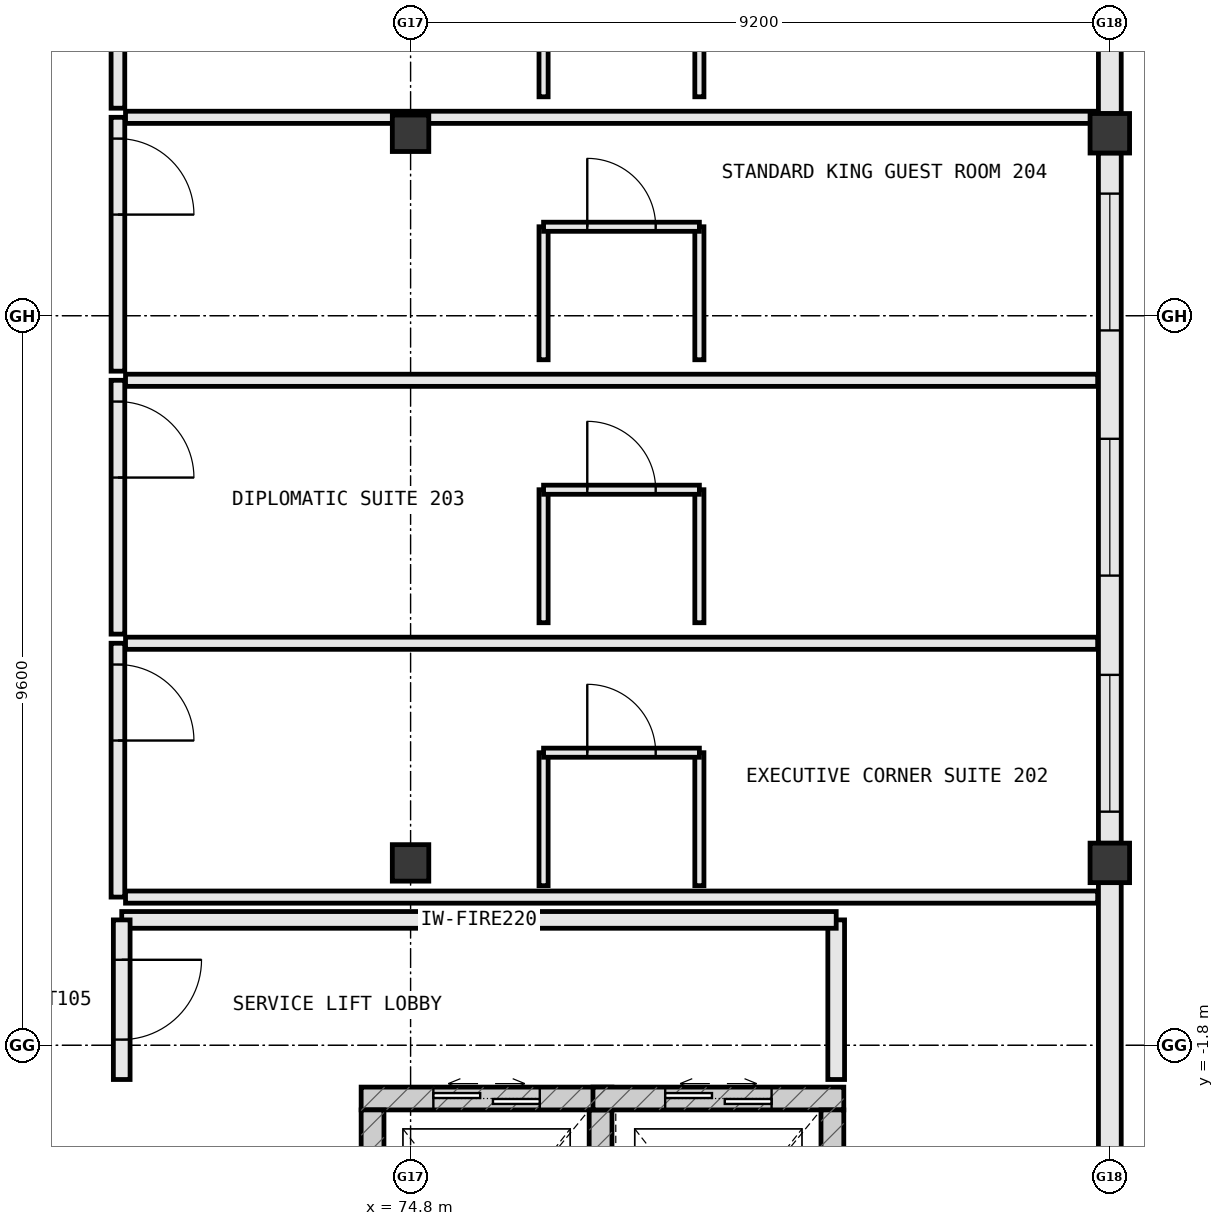
"""IFC4 building model, lengths in metres.
Left out: names, types, materials, properties, quantities, classifications, styles, units other than length and angle.
Written with IfcOpenShell. Run it as: python <this file> out.ifc"""

import sys

from ifc_helpers import new_model, si_unit, direction, frame, frame_2d, origin, origin_2d, place, context, subcontext, project, spatial, rectangle, extrude, element, fill, save


model = new_model("IFC4")
c1 = context("Model", 3, precision=1e-05, world=origin(), true_north=direction((0.0, 1.0)))
c2 = subcontext(c1, "Body", "Model", "MODEL_VIEW")
j1 = project(units=[si_unit("LENGTHUNIT", "METRE"), si_unit("PLANEANGLEUNIT", "RADIAN")], contexts=[c1])
p1 = place(None, origin())
s1 = spatial("IfcSite", under=j1, at=p1, CompositionType="ELEMENT")
p2 = place(p1, origin())
s2 = spatial("IfcBuilding", under=s1, at=p2, CompositionType="ELEMENT")
p3 = place(p2, frame((0.0, 0.0, 27.6)))
s3 = spatial("IfcBuildingStorey", under=s2, at=p3, CompositionType="ELEMENT", Elevation=27.6)
for number, where, z_axis, x_axis in (
    (1, (74.8, 0.6, 0.0), (0.0, 0.0, 1.0), (1.0, 0.0, 0.0)),
    (2, (74.8, 10.2, 0.0), (0.0, 0.0, 1.0), (1.0, 0.0, 0.0)),
):
    element("IfcColumn", number, at=place(p3, frame(where, z_axis=z_axis, x_axis=x_axis)), inside=s3, PredefinedType="COLUMN", context=c2, shape_type="SweptSolid", body=[
        extrude(rectangle(XDim=0.48, YDim=0.48, at=origin_2d()), origin(), (0.0, 0.0, 1.0), 3.8),
    ])
for number, where, z_axis, x_axis in (
    (3, (84.0, 0.6, 0.0), (0.0, 0.0, 1.0), (1.0, 0.0, 0.0)),
    (4, (84.0, 10.2, 0.0), (0.0, 0.0, 1.0), (1.0, 0.0, 0.0)),
):
    element("IfcColumn", number, at=place(p3, frame(where, z_axis=z_axis, x_axis=x_axis)), inside=s3, PredefinedType="COLUMN", context=c2, shape_type="SweptSolid", body=[
        extrude(rectangle(XDim=0.52, YDim=0.52, at=origin_2d()), origin(), (0.0, 0.0, 1.0), 3.8),
    ])
p4 = place(p3, frame((84.0, -8.742, 0.0), z_axis=(0.0, 0.0, 1.0), x_axis=(0.0, 1.0, 0.0)))
e5 = element("IfcWall", 5, at=p4, inside=s3, PredefinedType="STANDARD", context=c2, shape_type="SweptSolid", body=[
    extrude(rectangle(XDim=9.084, YDim=0.3, at=frame_2d((4.542, 0.0))), origin(), (0.0, 0.0, 1.0), 2.97),
])
p5 = place(p4, frame((1.446, 0.0, 0.85)))
e6 = element("IfcOpeningElement", 6, at=p5, cuts=e5, PredefinedType="OPENING", context=c2, shape_type="SweptSolid", body=[
    extrude(rectangle(XDim=1.65, YDim=1.8, at=frame_2d((0.825, 0.9))), frame((0.0, 0.162, 0.0), z_axis=(0.0, -1.0, 0.0), x_axis=(1.0, 0.0, 0.0)), (0.0, 0.0, 1.0), 0.324),
])
p6 = place(p3, frame((84.0, 0.858, 0.0), z_axis=(0.0, 0.0, 1.0), x_axis=(0.0, 1.0, 0.0)))
e7 = element("IfcWall", 7, at=p6, inside=s3, PredefinedType="STANDARD", context=c2, shape_type="SweptSolid", body=[
    extrude(rectangle(XDim=9.084, YDim=0.3, at=frame_2d((4.542, 0.0))), origin(), (0.0, 0.0, 1.0), 2.97),
])
p7 = place(p6, frame((0.416, 0.0, 0.85)))
e8 = element("IfcOpeningElement", 8, at=p7, cuts=e7, PredefinedType="OPENING", context=c2, shape_type="SweptSolid", body=[
    extrude(rectangle(XDim=1.8, YDim=1.85, at=frame_2d((0.9, 0.925))), frame((0.0, 0.162, 0.0), z_axis=(0.0, -1.0, 0.0), x_axis=(1.0, 0.0, 0.0)), (0.0, 0.0, 1.0), 0.324),
])
p8 = place(p6, frame((3.522, 0.0, 0.85)))
e9 = element("IfcOpeningElement", 9, at=p8, cuts=e7, PredefinedType="OPENING", context=c2, shape_type="SweptSolid", body=[
    extrude(rectangle(XDim=1.8, YDim=1.85, at=frame_2d((0.9, 0.925))), frame((0.0, 0.162, 0.0), z_axis=(0.0, -1.0, 0.0), x_axis=(1.0, 0.0, 0.0)), (0.0, 0.0, 1.0), 0.324),
])
p9 = place(p6, frame((6.748, 0.0, 0.85)))
e10 = element("IfcOpeningElement", 10, at=p9, cuts=e7, PredefinedType="OPENING", context=c2, shape_type="SweptSolid", body=[
    extrude(rectangle(XDim=1.8, YDim=1.85, at=frame_2d((0.9, 0.925))), frame((0.0, 0.162, 0.0), z_axis=(0.0, -1.0, 0.0), x_axis=(1.0, 0.0, 0.0)), (0.0, 0.0, 1.0), 0.324),
])
p10 = place(p3, frame((84.0, 10.458, 0.0), z_axis=(0.0, 0.0, 1.0), x_axis=(0.0, 1.0, 0.0)))
e11 = element("IfcWall", 11, at=p10, inside=s3, PredefinedType="STANDARD", context=c2, shape_type="SweptSolid", body=[
    extrude(rectangle(XDim=7.884, YDim=0.3, at=frame_2d((3.942, 0.0))), origin(), (0.0, 0.0, 1.0), 2.97),
])
p11 = place(p10, frame((0.842, 0.0, 0.85)))
e12 = element("IfcOpeningElement", 12, at=p11, cuts=e11, PredefinedType="OPENING", context=c2, shape_type="SweptSolid", body=[
    extrude(rectangle(XDim=1.8, YDim=1.85, at=frame_2d((0.9, 0.925))), frame((0.0, 0.162, 0.0), z_axis=(0.0, -1.0, 0.0), x_axis=(1.0, 0.0, 0.0)), (0.0, 0.0, 1.0), 0.324),
])
p12 = place(p10, frame((4.302, 0.0, 0.85)))
e13 = element("IfcOpeningElement", 13, at=p12, cuts=e11, PredefinedType="OPENING", context=c2, shape_type="SweptSolid", body=[
    extrude(rectangle(XDim=1.8, YDim=1.85, at=frame_2d((0.9, 0.925))), frame((0.0, 0.162, 0.0), z_axis=(0.0, -1.0, 0.0), x_axis=(1.0, 0.0, 0.0)), (0.0, 0.0, 1.0), 0.324),
])
p13 = place(p3, frame((77.45, -2.5, 0.0), z_axis=(0.0, 0.0, 1.0), x_axis=(-1.0, 0.0, 0.0)))
e14 = element("IfcWall", 14, at=p13, inside=s3, PredefinedType="SHEAR", context=c2, shape_type="SweptSolid", body=[
    extrude(rectangle(XDim=3.3, YDim=0.3, at=frame_2d((1.65, 0.0))), origin(), (0.0, 0.0, 1.0), 3.8),
])
p14 = place(p13, frame((0.95, 0.0, 0.0)))
e15 = element("IfcOpeningElement", 15, at=p14, cuts=e14, PredefinedType="OPENING", context=c2, shape_type="SweptSolid", body=[
    extrude(rectangle(XDim=1.4, YDim=2.2, at=frame_2d((0.7, 1.1))), frame((0.0, 0.162, 0.0), z_axis=(0.0, -1.0, 0.0), x_axis=(1.0, 0.0, 0.0)), (0.0, 0.0, 1.0), 0.324),
])
for number, where, z_axis, x_axis in (
    (16, (77.3, -5.95, 0.0), (0.0, 0.0, 1.0), (0.0, 1.0, 0.0)),
    (17, (74.3, -2.65, 0.0), (0.0, 0.0, 1.0), (0.0, -1.0, 0.0)),
):
    element("IfcWall", number, at=place(p3, frame(where, z_axis=z_axis, x_axis=x_axis)), inside=s3, PredefinedType="SHEAR", context=c2, shape_type="SweptSolid", body=[
        extrude(rectangle(XDim=3.3, YDim=0.3, at=frame_2d((1.65, 0.0))), origin(), (0.0, 0.0, 1.0), 3.8),
    ])
p15 = place(p3, frame((80.5, -2.5, 0.0), z_axis=(0.0, 0.0, 1.0), x_axis=(-1.0, 0.0, 0.0)))
e18 = element("IfcWall", 18, at=p15, inside=s3, PredefinedType="SHEAR", context=c2, shape_type="SweptSolid", body=[
    extrude(rectangle(XDim=3.3, YDim=0.3, at=frame_2d((1.65, 0.0))), origin(), (0.0, 0.0, 1.0), 3.8),
])
p16 = place(p15, frame((0.95, 0.0, 0.0)))
e19 = element("IfcOpeningElement", 19, at=p16, cuts=e18, PredefinedType="OPENING", context=c2, shape_type="SweptSolid", body=[
    extrude(rectangle(XDim=1.4, YDim=2.2, at=frame_2d((0.7, 1.1))), frame((0.0, 0.162, 0.0), z_axis=(0.0, -1.0, 0.0), x_axis=(1.0, 0.0, 0.0)), (0.0, 0.0, 1.0), 0.324),
])
p17 = place(p3, frame((80.35, -5.95, 0.0), z_axis=(0.0, 0.0, 1.0), x_axis=(0.0, 1.0, 0.0)))
e20 = element("IfcWall", 20, at=p17, inside=s3, PredefinedType="SHEAR", context=c2, shape_type="SweptSolid", body=[
    extrude(rectangle(XDim=3.3, YDim=0.3, at=frame_2d((1.65, 0.0))), origin(), (0.0, 0.0, 1.0), 3.8),
])
p18 = place(p3, frame((80.4, -2.25, 0.0), z_axis=(0.0, 0.0, 1.0), x_axis=(0.0, 1.0, 0.0)))
e21 = element("IfcWall", 21, at=p18, inside=s3, PredefinedType="STANDARD", context=c2, shape_type="SweptSolid", body=[
    extrude(rectangle(XDim=2.1, YDim=0.22, at=frame_2d((1.05, 0.0))), origin(), (0.0, 0.0, 1.0), 3.555),
])
p19 = place(p3, frame((80.4, -0.15, 0.0), z_axis=(0.0, 0.0, 1.0), x_axis=(-1.0, 0.0, 0.0)))
e22 = element("IfcWall", 22, at=p19, inside=s3, PredefinedType="STANDARD", context=c2, shape_type="SweptSolid", body=[
    extrude(rectangle(XDim=9.4, YDim=0.22, at=frame_2d((4.7, 0.0))), origin(), (0.0, 0.0, 1.0), 3.555),
])
p20 = place(p3, frame((71.0, -0.15, 0.0), z_axis=(0.0, 0.0, 1.0), x_axis=(0.0, -1.0, 0.0)))
e23 = element("IfcWall", 23, at=p20, inside=s3, PredefinedType="STANDARD", context=c2, shape_type="SweptSolid", body=[
    extrude(rectangle(XDim=2.1, YDim=0.22, at=frame_2d((1.05, 0.0))), origin(), (0.0, 0.0, 1.0), 3.555),
])
p21 = place(p20, frame((0.525, 0.0, 0.0)))
e24 = element("IfcOpeningElement", 24, at=p21, cuts=e23, PredefinedType="OPENING", context=c2, shape_type="SweptSolid", body=[
    extrude(rectangle(XDim=1.05, YDim=2.2, at=frame_2d((0.525, 1.1))), frame((0.0, 0.122, 0.0), z_axis=(0.0, -1.0, 0.0), x_axis=(1.0, 0.0, 0.0)), (0.0, 0.0, 1.0), 0.244),
])
p22 = place(p3, frame((70.95, 3.49, 0.0), z_axis=(0.0, 0.0, 1.0), x_axis=(0.0, -1.0, 0.0)))
e25 = element("IfcWall", 25, at=p22, inside=s3, PredefinedType="PARTITIONING", context=c2, shape_type="SweptSolid", body=[
    extrude(rectangle(XDim=3.34, YDim=0.18, at=frame_2d((1.67, 0.0))), origin(), (0.0, 0.0, 1.0), 3.555),
])
p23 = place(p22, frame((0.28, 0.0, 0.0)))
e26 = element("IfcOpeningElement", 26, at=p23, cuts=e25, PredefinedType="OPENING", context=c2, shape_type="SweptSolid", body=[
    extrude(rectangle(XDim=1.0, YDim=2.2, at=frame_2d((0.5, 1.1))), frame((0.0, 0.102, 0.0), z_axis=(0.0, -1.0, 0.0), x_axis=(1.0, 0.0, 0.0)), (0.0, 0.0, 1.0), 0.204),
])
for number, where, z_axis, x_axis in (
    (27, (71.05, 0.15, 0.0), (0.0, 0.0, 1.0), (1.0, 0.0, 0.0)),
    (28, (71.05, 3.49, 0.0), (0.0, 0.0, 1.0), (1.0, 0.0, 0.0)),
):
    element("IfcWall", number, at=place(p3, frame(where, z_axis=z_axis, x_axis=x_axis)), inside=s3, PredefinedType="PARTITIONING", context=c2, shape_type="SweptSolid", body=[
        extrude(rectangle(XDim=12.79, YDim=0.16, at=frame_2d((6.395, 0.0))), origin(), (0.0, 0.0, 1.0), 3.555),
    ])
for number, where, z_axis, x_axis in (
    (29, (76.55, 0.3, 0.0), (0.0, 0.0, 1.0), (0.0, 1.0, 0.0)),
    (30, (78.6, 0.3, 0.0), (0.0, 0.0, 1.0), (0.0, 1.0, 0.0)),
):
    element("IfcWall", number, at=place(p3, frame(where, z_axis=z_axis, x_axis=x_axis)), inside=s3, PredefinedType="PARTITIONING", context=c2, shape_type="SweptSolid", body=[
        extrude(rectangle(XDim=1.75, YDim=0.12, at=frame_2d((0.875, 0.0))), origin(), (0.0, 0.0, 1.0), 3.555),
    ])
p24 = place(p3, frame((76.55, 2.05, 0.0), z_axis=(0.0, 0.0, 1.0), x_axis=(1.0, 0.0, 0.0)))
e31 = element("IfcWall", 31, at=p24, inside=s3, PredefinedType="PARTITIONING", context=c2, shape_type="SweptSolid", body=[
    extrude(rectangle(XDim=2.05, YDim=0.12, at=frame_2d((1.025, 0.0))), origin(), (0.0, 0.0, 1.0), 3.555),
])
p25 = place(p24, frame((0.575, 0.0, 0.0)))
e32 = element("IfcOpeningElement", 32, at=p25, cuts=e31, PredefinedType="OPENING", context=c2, shape_type="SweptSolid", body=[
    extrude(rectangle(XDim=0.9, YDim=2.15, at=frame_2d((0.45, 1.075))), frame((0.0, 0.072, 0.0), z_axis=(0.0, -1.0, 0.0), x_axis=(1.0, 0.0, 0.0)), (0.0, 0.0, 1.0), 0.144),
])
p26 = place(p3, frame((70.95, 6.95, 0.0), z_axis=(0.0, 0.0, 1.0), x_axis=(0.0, -1.0, 0.0)))
e33 = element("IfcWall", 33, at=p26, inside=s3, PredefinedType="PARTITIONING", context=c2, shape_type="SweptSolid", body=[
    extrude(rectangle(XDim=3.34, YDim=0.18, at=frame_2d((1.67, 0.0))), origin(), (0.0, 0.0, 1.0), 3.555),
])
p27 = place(p26, frame((0.28, 0.0, 0.0)))
e34 = element("IfcOpeningElement", 34, at=p27, cuts=e33, PredefinedType="OPENING", context=c2, shape_type="SweptSolid", body=[
    extrude(rectangle(XDim=1.0, YDim=2.2, at=frame_2d((0.5, 1.1))), frame((0.0, 0.102, 0.0), z_axis=(0.0, -1.0, 0.0), x_axis=(1.0, 0.0, 0.0)), (0.0, 0.0, 1.0), 0.204),
])
p28 = place(p3, frame((71.05, 6.95, 0.0), z_axis=(0.0, 0.0, 1.0), x_axis=(1.0, 0.0, 0.0)))
e35 = element("IfcWall", 35, at=p28, inside=s3, PredefinedType="PARTITIONING", context=c2, shape_type="SweptSolid", body=[
    extrude(rectangle(XDim=12.79, YDim=0.16, at=frame_2d((6.395, 0.0))), origin(), (0.0, 0.0, 1.0), 3.555),
])
for number, where, z_axis, x_axis in (
    (36, (76.55, 3.76, 0.0), (0.0, 0.0, 1.0), (0.0, 1.0, 0.0)),
    (37, (78.6, 3.76, 0.0), (0.0, 0.0, 1.0), (0.0, 1.0, 0.0)),
):
    element("IfcWall", number, at=place(p3, frame(where, z_axis=z_axis, x_axis=x_axis)), inside=s3, PredefinedType="PARTITIONING", context=c2, shape_type="SweptSolid", body=[
        extrude(rectangle(XDim=1.75, YDim=0.12, at=frame_2d((0.875, 0.0))), origin(), (0.0, 0.0, 1.0), 3.555),
    ])
p29 = place(p3, frame((76.55, 5.51, 0.0), z_axis=(0.0, 0.0, 1.0), x_axis=(1.0, 0.0, 0.0)))
e38 = element("IfcWall", 38, at=p29, inside=s3, PredefinedType="PARTITIONING", context=c2, shape_type="SweptSolid", body=[
    extrude(rectangle(XDim=2.05, YDim=0.12, at=frame_2d((1.025, 0.0))), origin(), (0.0, 0.0, 1.0), 3.555),
])
p30 = place(p29, frame((0.575, 0.0, 0.0)))
e39 = element("IfcOpeningElement", 39, at=p30, cuts=e38, PredefinedType="OPENING", context=c2, shape_type="SweptSolid", body=[
    extrude(rectangle(XDim=0.9, YDim=2.15, at=frame_2d((0.45, 1.075))), frame((0.0, 0.072, 0.0), z_axis=(0.0, -1.0, 0.0), x_axis=(1.0, 0.0, 0.0)), (0.0, 0.0, 1.0), 0.144),
])
p31 = place(p3, frame((70.95, 10.41, 0.0), z_axis=(0.0, 0.0, 1.0), x_axis=(0.0, -1.0, 0.0)))
e40 = element("IfcWall", 40, at=p31, inside=s3, PredefinedType="PARTITIONING", context=c2, shape_type="SweptSolid", body=[
    extrude(rectangle(XDim=3.34, YDim=0.18, at=frame_2d((1.67, 0.0))), origin(), (0.0, 0.0, 1.0), 3.555),
])
p32 = place(p31, frame((0.28, 0.0, 0.0)))
e41 = element("IfcOpeningElement", 41, at=p32, cuts=e40, PredefinedType="OPENING", context=c2, shape_type="SweptSolid", body=[
    extrude(rectangle(XDim=1.0, YDim=2.2, at=frame_2d((0.5, 1.1))), frame((0.0, 0.102, 0.0), z_axis=(0.0, -1.0, 0.0), x_axis=(1.0, 0.0, 0.0)), (0.0, 0.0, 1.0), 0.204),
])
p33 = place(p3, frame((71.05, 10.41, 0.0), z_axis=(0.0, 0.0, 1.0), x_axis=(1.0, 0.0, 0.0)))
e42 = element("IfcWall", 42, at=p33, inside=s3, PredefinedType="PARTITIONING", context=c2, shape_type="SweptSolid", body=[
    extrude(rectangle(XDim=12.79, YDim=0.16, at=frame_2d((6.395, 0.0))), origin(), (0.0, 0.0, 1.0), 2.93),
])
for number, where, z_axis, x_axis in (
    (43, (76.55, 7.22, 0.0), (0.0, 0.0, 1.0), (0.0, 1.0, 0.0)),
    (44, (78.6, 7.22, 0.0), (0.0, 0.0, 1.0), (0.0, 1.0, 0.0)),
):
    element("IfcWall", number, at=place(p3, frame(where, z_axis=z_axis, x_axis=x_axis)), inside=s3, PredefinedType="PARTITIONING", context=c2, shape_type="SweptSolid", body=[
        extrude(rectangle(XDim=1.75, YDim=0.12, at=frame_2d((0.875, 0.0))), origin(), (0.0, 0.0, 1.0), 3.555),
    ])
p34 = place(p3, frame((76.55, 8.97, 0.0), z_axis=(0.0, 0.0, 1.0), x_axis=(1.0, 0.0, 0.0)))
e45 = element("IfcWall", 45, at=p34, inside=s3, PredefinedType="PARTITIONING", context=c2, shape_type="SweptSolid", body=[
    extrude(rectangle(XDim=2.05, YDim=0.12, at=frame_2d((1.025, 0.0))), origin(), (0.0, 0.0, 1.0), 3.555),
])
p35 = place(p34, frame((0.575, 0.0, 0.0)))
e46 = element("IfcOpeningElement", 46, at=p35, cuts=e45, PredefinedType="OPENING", context=c2, shape_type="SweptSolid", body=[
    extrude(rectangle(XDim=0.9, YDim=2.15, at=frame_2d((0.45, 1.075))), frame((0.0, 0.072, 0.0), z_axis=(0.0, -1.0, 0.0), x_axis=(1.0, 0.0, 0.0)), (0.0, 0.0, 1.0), 0.144),
])
p36 = place(p3, frame((70.95, 13.87, 0.0), z_axis=(0.0, 0.0, 1.0), x_axis=(0.0, -1.0, 0.0)))
e47 = element("IfcWall", 47, at=p36, inside=s3, PredefinedType="PARTITIONING", context=c2, shape_type="SweptSolid", body=[
    extrude(rectangle(XDim=3.34, YDim=0.18, at=frame_2d((1.67, 0.0))), origin(), (0.0, 0.0, 1.0), 3.555),
])
p37 = place(p36, frame((0.28, 0.0, 0.0)))
e48 = element("IfcOpeningElement", 48, at=p37, cuts=e47, PredefinedType="OPENING", context=c2, shape_type="SweptSolid", body=[
    extrude(rectangle(XDim=1.0, YDim=2.2, at=frame_2d((0.5, 1.1))), frame((0.0, 0.102, 0.0), z_axis=(0.0, -1.0, 0.0), x_axis=(1.0, 0.0, 0.0)), (0.0, 0.0, 1.0), 0.204),
])
for number, where, z_axis, x_axis in (
    (49, (76.55, 10.68, 0.0), (0.0, 0.0, 1.0), (0.0, 1.0, 0.0)),
    (50, (78.6, 10.68, 0.0), (0.0, 0.0, 1.0), (0.0, 1.0, 0.0)),
):
    element("IfcWall", number, at=place(p3, frame(where, z_axis=z_axis, x_axis=x_axis)), inside=s3, PredefinedType="PARTITIONING", context=c2, shape_type="SweptSolid", body=[
        extrude(rectangle(XDim=1.75, YDim=0.12, at=frame_2d((0.875, 0.0))), origin(), (0.0, 0.0, 1.0), 3.555),
    ])
p38 = place(p7, origin())
e51 = element("IfcWindow", 51, at=p38, inside=s3, PartitioningType="SINGLE_PANEL", PredefinedType="WINDOW", context=c2, shape_type="SweptSolid", body=[
    extrude(rectangle(XDim=1.8, YDim=1.85, at=frame_2d((0.9, 0.925))), frame((0.0, 0.03, 0.0), z_axis=(0.0, -1.0, 0.0), x_axis=(1.0, 0.0, 0.0)), (0.0, 0.0, 1.0), 0.06),
])
fill(e8, e51)
p39 = place(p8, origin())
e52 = element("IfcWindow", 52, at=p39, inside=s3, PartitioningType="SINGLE_PANEL", PredefinedType="WINDOW", context=c2, shape_type="SweptSolid", body=[
    extrude(rectangle(XDim=1.8, YDim=1.85, at=frame_2d((0.9, 0.925))), frame((0.0, 0.03, 0.0), z_axis=(0.0, -1.0, 0.0), x_axis=(1.0, 0.0, 0.0)), (0.0, 0.0, 1.0), 0.06),
])
fill(e9, e52)
p40 = place(p9, origin())
e53 = element("IfcWindow", 53, at=p40, inside=s3, PartitioningType="SINGLE_PANEL", PredefinedType="WINDOW", context=c2, shape_type="SweptSolid", body=[
    extrude(rectangle(XDim=1.8, YDim=1.85, at=frame_2d((0.9, 0.925))), frame((0.0, 0.03, 0.0), z_axis=(0.0, -1.0, 0.0), x_axis=(1.0, 0.0, 0.0)), (0.0, 0.0, 1.0), 0.06),
])
fill(e10, e53)
p41 = place(p14, origin())
e54 = element("IfcDoor", 54, at=p41, inside=s3, OperationType="DOUBLE_DOOR_SLIDING", PredefinedType="DOOR", context=c2, shape_type="SweptSolid", body=[
    extrude(rectangle(XDim=1.4, YDim=2.2, at=frame_2d((0.7, 1.1))), frame((0.0, 0.025, 0.0), z_axis=(0.0, -1.0, 0.0), x_axis=(1.0, 0.0, 0.0)), (0.0, 0.0, 1.0), 0.05),
])
fill(e15, e54)
p42 = place(p16, origin())
e55 = element("IfcDoor", 55, at=p42, inside=s3, OperationType="DOUBLE_DOOR_SLIDING", PredefinedType="DOOR", context=c2, shape_type="SweptSolid", body=[
    extrude(rectangle(XDim=1.4, YDim=2.2, at=frame_2d((0.7, 1.1))), frame((0.0, 0.025, 0.0), z_axis=(0.0, -1.0, 0.0), x_axis=(1.0, 0.0, 0.0)), (0.0, 0.0, 1.0), 0.05),
])
fill(e19, e55)
p43 = place(p21, origin())
e56 = element("IfcDoor", 56, at=p43, inside=s3, OperationType="SINGLE_SWING_LEFT", PredefinedType="DOOR", context=c2, shape_type="SweptSolid", body=[
    extrude(rectangle(XDim=1.05, YDim=2.2, at=frame_2d((0.525, 1.1))), frame((0.0, 0.025, 0.0), z_axis=(0.0, -1.0, 0.0), x_axis=(1.0, 0.0, 0.0)), (0.0, 0.0, 1.0), 0.05),
])
fill(e24, e56)
p44 = place(p23, origin())
e57 = element("IfcDoor", 57, at=p44, inside=s3, OperationType="SINGLE_SWING_RIGHT", PredefinedType="DOOR", context=c2, shape_type="SweptSolid", body=[
    extrude(rectangle(XDim=1.0, YDim=2.2, at=frame_2d((0.5, 1.1))), frame((0.0, 0.025, 0.0), z_axis=(0.0, -1.0, 0.0), x_axis=(1.0, 0.0, 0.0)), (0.0, 0.0, 1.0), 0.05),
])
fill(e26, e57)
p45 = place(p25, origin())
e58 = element("IfcDoor", 58, at=p45, inside=s3, OperationType="SINGLE_SWING_LEFT", PredefinedType="DOOR", context=c2, shape_type="SweptSolid", body=[
    extrude(rectangle(XDim=0.9, YDim=2.15, at=frame_2d((0.45, 1.075))), frame((0.0, 0.025, 0.0), z_axis=(0.0, -1.0, 0.0), x_axis=(1.0, 0.0, 0.0)), (0.0, 0.0, 1.0), 0.05),
])
fill(e32, e58)
p46 = place(p27, origin())
e59 = element("IfcDoor", 59, at=p46, inside=s3, OperationType="SINGLE_SWING_RIGHT", PredefinedType="DOOR", context=c2, shape_type="SweptSolid", body=[
    extrude(rectangle(XDim=1.0, YDim=2.2, at=frame_2d((0.5, 1.1))), frame((0.0, 0.025, 0.0), z_axis=(0.0, -1.0, 0.0), x_axis=(1.0, 0.0, 0.0)), (0.0, 0.0, 1.0), 0.05),
])
fill(e34, e59)
p47 = place(p30, origin())
e60 = element("IfcDoor", 60, at=p47, inside=s3, OperationType="SINGLE_SWING_LEFT", PredefinedType="DOOR", context=c2, shape_type="SweptSolid", body=[
    extrude(rectangle(XDim=0.9, YDim=2.15, at=frame_2d((0.45, 1.075))), frame((0.0, 0.025, 0.0), z_axis=(0.0, -1.0, 0.0), x_axis=(1.0, 0.0, 0.0)), (0.0, 0.0, 1.0), 0.05),
])
fill(e39, e60)
p48 = place(p32, origin())
e61 = element("IfcDoor", 61, at=p48, inside=s3, OperationType="SINGLE_SWING_RIGHT", PredefinedType="DOOR", context=c2, shape_type="SweptSolid", body=[
    extrude(rectangle(XDim=1.0, YDim=2.2, at=frame_2d((0.5, 1.1))), frame((0.0, 0.025, 0.0), z_axis=(0.0, -1.0, 0.0), x_axis=(1.0, 0.0, 0.0)), (0.0, 0.0, 1.0), 0.05),
])
fill(e41, e61)
p49 = place(p35, origin())
e62 = element("IfcDoor", 62, at=p49, inside=s3, OperationType="SINGLE_SWING_LEFT", PredefinedType="DOOR", context=c2, shape_type="SweptSolid", body=[
    extrude(rectangle(XDim=0.9, YDim=2.15, at=frame_2d((0.45, 1.075))), frame((0.0, 0.025, 0.0), z_axis=(0.0, -1.0, 0.0), x_axis=(1.0, 0.0, 0.0)), (0.0, 0.0, 1.0), 0.05),
])
fill(e46, e62)
save(model, sys.argv[1])
